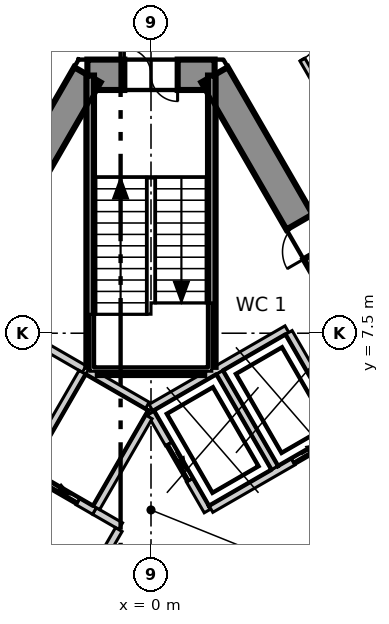
"""IFC4 building model, lengths in metres.
Left out: names, types, materials, properties, quantities, classifications, styles, units other than length and angle.
Written with IfcOpenShell. Run it as: python <this file> out.ifc"""

import sys

from ifc_helpers import new_model, si_unit, direction, frame, frame_2d, origin, place, context, subcontext, project, spatial, polyline, rectangle, outline, extrude, element, fill, save


model = new_model("IFC4")
c1 = context("Model", 3, precision=1e-05, world=origin(), true_north=direction((0.0, 1.0)))
c2 = subcontext(c1, "Body", "Model", "MODEL_VIEW")
j1 = project(units=[si_unit("LENGTHUNIT", "METRE"), si_unit("PLANEANGLEUNIT", "RADIAN")], contexts=[c1])
p1 = place(None, origin())
s1 = spatial("IfcSite", under=j1, at=p1, CompositionType="ELEMENT")
p2 = place(p1, origin())
s2 = spatial("IfcBuilding", under=s1, at=p2, CompositionType="ELEMENT")
p3 = place(p2, frame((0.0, 0.0, 140.3)))
s3 = spatial("IfcBuildingStorey", under=s2, at=p3, CompositionType="ELEMENT", Elevation=140.3)
p4 = place(p3, frame((1.674, 14.3, -0.3), z_axis=(0.0, 0.0, 1.0), x_axis=(-1.0, 0.0, 0.0)))
e1 = element("IfcWall", 1, at=p4, inside=s3, PredefinedType="SHEAR", context=c2, shape_type="SweptSolid", body=[
    extrude(outline(polyline([(-0.231, -0.4), (1.674, -0.4), (3.579, -0.4), (3.117, 0.4), (1.674, 0.4), (0.231, 0.4), (-0.231, -0.4)])), origin(), (0.0, 0.0, 1.0), 4.0),
])
p5 = place(p4, frame((0.974, 0.0, 0.3)))
e2 = element("IfcOpeningElement", 2, at=p5, cuts=e1, PredefinedType="OPENING", context=c2, shape_type="SweptSolid", body=[
    extrude(rectangle(XDim=1.4, YDim=2.1, at=frame_2d((0.7, 1.05))), frame((0.0, 0.41, 0.0), z_axis=(0.0, -1.0, 0.0), x_axis=(1.0, 0.0, 0.0)), (0.0, 0.0, 1.0), 0.82),
])
p6 = place(p3, frame((-1.674, 14.3, -0.3), z_axis=(0.0, 0.0, 1.0), x_axis=(-0.499995765644, -0.866027848477, 0.0)))
e3 = element("IfcWall", 3, at=p6, inside=s3, PredefinedType="SHEAR", context=c2, shape_type="SweptSolid", body=[
    extrude(outline(polyline([(-0.231, -0.4), (1.732, -0.4), (3.695, -0.4), (5.658, -0.4), (7.621, -0.4), (9.584, -0.4), (11.547, -0.4), (13.51, -0.4), (15.473, -0.4), (17.436, -0.4), (19.399, -0.4), (21.362, -0.4), (23.325, -0.4), (22.863, 0.4), (20.977, 0.4), (19.091, 0.4), (17.205, 0.4), (15.319, 0.4), (13.433, 0.4), (11.547, 0.4), (9.661, 0.4), (7.775, 0.4), (5.889, 0.4), (4.003, 0.4), (2.117, 0.4), (0.231, 0.4), (-0.231, -0.4)])), origin(), (0.0, 0.0, 1.0), 4.0),
])
p7 = place(p6, frame((10.997, 0.0, 0.3)))
e4 = element("IfcOpeningElement", 4, at=p7, cuts=e3, PredefinedType="OPENING", context=c2, shape_type="SweptSolid", body=[
    extrude(rectangle(XDim=1.1, YDim=2.1, at=frame_2d((0.55, 1.05))), frame((0.0, 0.41, 0.0), z_axis=(0.0, -1.0, 0.0), x_axis=(1.0, 0.0, 0.0)), (0.0, 0.0, 1.0), 0.82),
])
p8 = place(p6, frame((4.474, 0.0, 0.3)))
e5 = element("IfcOpeningElement", 5, at=p8, cuts=e3, PredefinedType="OPENING", context=c2, shape_type="SweptSolid", body=[
    extrude(rectangle(XDim=0.9, YDim=2.1, at=frame_2d((0.45, 1.05))), frame((0.0, 0.41, 0.0), z_axis=(0.0, -1.0, 0.0), x_axis=(1.0, 0.0, 0.0)), (0.0, 0.0, 1.0), 0.82),
])
p9 = place(p3, frame((13.221, -5.7, -0.3), z_axis=(0.0, 0.0, 1.0), x_axis=(-0.499995765644, 0.866027848477, 0.0)))
e6 = element("IfcWall", 6, at=p9, inside=s3, PredefinedType="SHEAR", context=c2, shape_type="SweptSolid", body=[
    extrude(outline(polyline([(-0.231, -0.4), (1.732, -0.4), (3.695, -0.4), (5.658, -0.4), (7.621, -0.4), (9.584, -0.4), (11.547, -0.4), (13.51, -0.4), (15.473, -0.4), (17.436, -0.4), (19.399, -0.4), (21.362, -0.4), (23.325, -0.4), (22.863, 0.4), (20.977, 0.4), (19.091, 0.4), (17.205, 0.4), (15.319, 0.4), (13.433, 0.4), (11.547, 0.4), (9.661, 0.4), (7.775, 0.4), (5.889, 0.4), (4.003, 0.4), (2.117, 0.4), (0.231, 0.4), (-0.231, -0.4)])), origin(), (0.0, 0.0, 1.0), 4.0),
])
p10 = place(p9, frame((10.647, 0.0, 0.3)))
e7 = element("IfcOpeningElement", 7, at=p10, cuts=e6, PredefinedType="OPENING", context=c2, shape_type="SweptSolid", body=[
    extrude(rectangle(XDim=1.8, YDim=2.1, at=frame_2d((0.9, 1.05))), frame((0.0, 0.41, 0.0), z_axis=(0.0, -1.0, 0.0), x_axis=(1.0, 0.0, 0.0)), (0.0, 0.0, 1.0), 0.82),
])
p11 = place(p9, frame((17.721, 0.0, 0.3)))
e8 = element("IfcOpeningElement", 8, at=p11, cuts=e6, PredefinedType="OPENING", context=c2, shape_type="SweptSolid", body=[
    extrude(rectangle(XDim=0.9, YDim=2.1, at=frame_2d((0.45, 1.05))), frame((0.0, 0.41, 0.0), z_axis=(0.0, -1.0, 0.0), x_axis=(1.0, 0.0, 0.0)), (0.0, 0.0, 1.0), 0.82),
])
p12 = place(p3, frame((31.126, -14.433, 0.0), z_axis=(0.0, 0.0, 1.0), x_axis=(-0.500008098571, 0.866020728022, 0.0)))
e9 = element("IfcWall", 9, at=p12, inside=s3, PredefinedType="ELEMENTEDWALL", context=c2, shape_type="SweptSolid", body=[
    extrude(rectangle(XDim=56.105, YDim=0.2, at=frame_2d((28.052, 0.0))), origin(), (0.0, 0.0, 1.0), 3.7),
])
p13 = place(p12, frame((2.198, 0.0, 0.9)))
e10 = element("IfcOpeningElement", 10, at=p13, cuts=e9, PredefinedType="OPENING", context=c2, shape_type="SweptSolid", body=[
    extrude(rectangle(XDim=4.9, YDim=2.5, at=frame_2d((2.45, 1.25))), frame((0.0, 0.11, 0.0), z_axis=(0.0, -1.0, 0.0), x_axis=(1.0, 0.0, 0.0)), (0.0, 0.0, 1.0), 0.22),
])
p14 = place(p12, frame((8.888, 0.0, 0.9)))
e11 = element("IfcOpeningElement", 11, at=p14, cuts=e9, PredefinedType="OPENING", context=c2, shape_type="SweptSolid", body=[
    extrude(rectangle(XDim=4.9, YDim=2.5, at=frame_2d((2.45, 1.25))), frame((0.0, 0.11, 0.0), z_axis=(0.0, -1.0, 0.0), x_axis=(1.0, 0.0, 0.0)), (0.0, 0.0, 1.0), 0.22),
])
p15 = place(p12, frame((15.578, 0.0, 0.9)))
e12 = element("IfcOpeningElement", 12, at=p15, cuts=e9, PredefinedType="OPENING", context=c2, shape_type="SweptSolid", body=[
    extrude(rectangle(XDim=4.9, YDim=2.5, at=frame_2d((2.45, 1.25))), frame((0.0, 0.11, 0.0), z_axis=(0.0, -1.0, 0.0), x_axis=(1.0, 0.0, 0.0)), (0.0, 0.0, 1.0), 0.22),
])
p16 = place(p12, frame((22.267, 0.0, 0.9)))
e13 = element("IfcOpeningElement", 13, at=p16, cuts=e9, PredefinedType="OPENING", context=c2, shape_type="SweptSolid", body=[
    extrude(rectangle(XDim=4.9, YDim=2.5, at=frame_2d((2.45, 1.25))), frame((0.0, 0.11, 0.0), z_axis=(0.0, -1.0, 0.0), x_axis=(1.0, 0.0, 0.0)), (0.0, 0.0, 1.0), 0.22),
])
p17 = place(p12, frame((28.957, 0.0, 0.9)))
e14 = element("IfcOpeningElement", 14, at=p17, cuts=e9, PredefinedType="OPENING", context=c2, shape_type="SweptSolid", body=[
    extrude(rectangle(XDim=4.9, YDim=2.5, at=frame_2d((2.45, 1.25))), frame((0.0, 0.11, 0.0), z_axis=(0.0, -1.0, 0.0), x_axis=(1.0, 0.0, 0.0)), (0.0, 0.0, 1.0), 0.22),
])
p18 = place(p12, frame((35.647, 0.0, 0.9)))
e15 = element("IfcOpeningElement", 15, at=p18, cuts=e9, PredefinedType="OPENING", context=c2, shape_type="SweptSolid", body=[
    extrude(rectangle(XDim=4.9, YDim=2.5, at=frame_2d((2.45, 1.25))), frame((0.0, 0.11, 0.0), z_axis=(0.0, -1.0, 0.0), x_axis=(1.0, 0.0, 0.0)), (0.0, 0.0, 1.0), 0.22),
])
p19 = place(p12, frame((42.337, 0.0, 0.9)))
e16 = element("IfcOpeningElement", 16, at=p19, cuts=e9, PredefinedType="OPENING", context=c2, shape_type="SweptSolid", body=[
    extrude(rectangle(XDim=4.9, YDim=2.5, at=frame_2d((2.45, 1.25))), frame((0.0, 0.11, 0.0), z_axis=(0.0, -1.0, 0.0), x_axis=(1.0, 0.0, 0.0)), (0.0, 0.0, 1.0), 0.22),
])
p20 = place(p12, frame((49.027, 0.0, 0.9)))
e17 = element("IfcOpeningElement", 17, at=p20, cuts=e9, PredefinedType="OPENING", context=c2, shape_type="SweptSolid", body=[
    extrude(rectangle(XDim=4.9, YDim=2.5, at=frame_2d((2.45, 1.25))), frame((0.0, 0.11, 0.0), z_axis=(0.0, -1.0, 0.0), x_axis=(1.0, 0.0, 0.0)), (0.0, 0.0, 1.0), 0.22),
])
p21 = place(p3, frame((-8.902, 6.181, 0.0), z_axis=(0.0, 0.0, 1.0), x_axis=(0.499992688384, 0.866029625107, 0.0)))
e18 = element("IfcWall", 18, at=p21, inside=s3, PredefinedType="PARTITIONING", context=c2, shape_type="SweptSolid", body=[
    extrude(rectangle(XDim=17.804, YDim=0.15, at=frame_2d((8.902, 0.0))), origin(), (0.0, 0.0, 1.0), 3.7),
])
p22 = place(p21, frame((14.554, 0.0, 0.0)))
e19 = element("IfcOpeningElement", 19, at=p22, cuts=e18, PredefinedType="OPENING", context=c2, shape_type="SweptSolid", body=[
    extrude(rectangle(XDim=1.1, YDim=2.1, at=frame_2d((0.55, 1.05))), frame((0.0, 0.085, 0.0), z_axis=(0.0, -1.0, 0.0), x_axis=(1.0, 0.0, 0.0)), (0.0, 0.0, 1.0), 0.17),
])
p23 = place(p21, frame((10.428, 0.0, 0.0)))
e20 = element("IfcOpeningElement", 20, at=p23, cuts=e18, PredefinedType="OPENING", context=c2, shape_type="SweptSolid", body=[
    extrude(rectangle(XDim=0.9, YDim=2.1, at=frame_2d((0.45, 1.05))), frame((0.0, 0.085, 0.0), z_axis=(0.0, -1.0, 0.0), x_axis=(1.0, 0.0, 0.0)), (0.0, 0.0, 1.0), 0.17),
])
p24 = place(p21, frame((7.228, 0.0, 0.0)))
e21 = element("IfcOpeningElement", 21, at=p24, cuts=e18, PredefinedType="OPENING", context=c2, shape_type="SweptSolid", body=[
    extrude(rectangle(XDim=0.9, YDim=2.1, at=frame_2d((0.45, 1.05))), frame((0.0, 0.085, 0.0), z_axis=(0.0, -1.0, 0.0), x_axis=(1.0, 0.0, 0.0)), (0.0, 0.0, 1.0), 0.17),
])
p25 = place(p21, frame((4.428, 0.0, 0.0)))
e22 = element("IfcOpeningElement", 22, at=p25, cuts=e18, PredefinedType="OPENING", context=c2, shape_type="SweptSolid", body=[
    extrude(rectangle(XDim=1.0, YDim=2.1, at=frame_2d((0.5, 1.05))), frame((0.0, 0.085, 0.0), z_axis=(0.0, -1.0, 0.0), x_axis=(1.0, 0.0, 0.0)), (0.0, 0.0, 1.0), 0.17),
])
p26 = place(p3, frame((0.076, 21.468, 0.0), z_axis=(0.0, 0.0, 1.0), x_axis=(0.499999691263, -0.866025582034, 0.0)))
e23 = element("IfcWall", 23, at=p26, inside=s3, PredefinedType="PARTITIONING", context=c2, shape_type="SweptSolid", body=[
    extrude(rectangle(XDim=24.342, YDim=0.15, at=frame_2d((12.171, 0.0))), origin(), (0.0, 0.0, 1.0), 3.7),
])
p27 = place(p26, frame((17.594, 0.0, 0.0)))
e24 = element("IfcOpeningElement", 24, at=p27, cuts=e23, PredefinedType="OPENING", context=c2, shape_type="SweptSolid", body=[
    extrude(rectangle(XDim=1.1, YDim=2.1, at=frame_2d((0.55, 1.05))), frame((0.0, 0.085, 0.0), z_axis=(0.0, -1.0, 0.0), x_axis=(1.0, 0.0, 0.0)), (0.0, 0.0, 1.0), 0.17),
])
p28 = place(p26, frame((6.814, 0.0, 0.0)))
e25 = element("IfcOpeningElement", 25, at=p28, cuts=e23, PredefinedType="OPENING", context=c2, shape_type="SweptSolid", body=[
    extrude(rectangle(XDim=1.0, YDim=2.1, at=frame_2d((0.5, 1.05))), frame((0.0, 0.085, 0.0), z_axis=(0.0, -1.0, 0.0), x_axis=(1.0, 0.0, 0.0)), (0.0, 0.0, 1.0), 0.17),
])
p29 = place(p26, frame((10.214, 0.0, 0.0)))
e26 = element("IfcOpeningElement", 26, at=p29, cuts=e23, PredefinedType="OPENING", context=c2, shape_type="SweptSolid", body=[
    extrude(rectangle(XDim=0.9, YDim=2.1, at=frame_2d((0.45, 1.05))), frame((0.0, 0.085, 0.0), z_axis=(0.0, -1.0, 0.0), x_axis=(1.0, 0.0, 0.0)), (0.0, 0.0, 1.0), 0.17),
])
p30 = place(p26, frame((1.924, 0.0, 0.0)))
e27 = element("IfcOpeningElement", 27, at=p30, cuts=e23, PredefinedType="OPENING", context=c2, shape_type="SweptSolid", body=[
    extrude(rectangle(XDim=1.1, YDim=2.1, at=frame_2d((0.55, 1.05))), frame((0.0, 0.085, 0.0), z_axis=(0.0, -1.0, 0.0), x_axis=(1.0, 0.0, 0.0)), (0.0, 0.0, 1.0), 0.17),
])
p31 = place(p3, frame((-0.002, 5.542, 0.0), z_axis=(0.0, 0.0, 1.0), x_axis=(0.866103910842, 0.499863997127, 0.0)))
e28 = element("IfcWall", 28, at=p31, inside=s3, PredefinedType="SOLIDWALL", context=c2, shape_type="SweptSolid", body=[
    extrude(rectangle(XDim=4.131, YDim=0.2, at=frame_2d((2.065, 0.0))), origin(), (0.0, 0.0, 1.0), 3.7),
])
p32 = place(p3, frame((0.0, 5.4, 0.0), z_axis=(0.0, 0.0, 1.0), x_axis=(0.500103862429, -0.865965430478, 0.0)))
e29 = element("IfcWall", 29, at=p32, inside=s3, PredefinedType="SOLIDWALL", context=c2, shape_type="SweptSolid", body=[
    extrude(rectangle(XDim=2.973, YDim=0.2, at=frame_2d((1.487, 0.0))), origin(), (0.0, 0.0, 1.0), 3.7),
])
p33 = place(p32, frame((0.937, 0.0, 0.0)))
e30 = element("IfcOpeningElement", 30, at=p33, cuts=e29, PredefinedType="OPENING", context=c2, shape_type="SweptSolid", body=[
    extrude(rectangle(XDim=1.1, YDim=2.1, at=frame_2d((0.55, 1.05))), frame((0.0, 0.11, 0.0), z_axis=(0.0, -1.0, 0.0), x_axis=(1.0, 0.0, 0.0)), (0.0, 0.0, 1.0), 0.22),
])
p34 = place(p3, frame((1.577, 2.874, 0.0), z_axis=(0.0, 0.0, 1.0), x_axis=(0.866073694534, 0.499916348638, 0.0)))
e31 = element("IfcWall", 31, at=p34, inside=s3, PredefinedType="SOLIDWALL", context=c2, shape_type="SweptSolid", body=[
    extrude(rectangle(XDim=5.777, YDim=0.2, at=frame_2d((2.888, 0.0))), origin(), (0.0, 0.0, 1.0), 3.7),
])
p35 = place(p34, frame((2.497, 0.0, 0.0)))
e32 = element("IfcOpeningElement", 32, at=p35, cuts=e31, PredefinedType="OPENING", context=c2, shape_type="SweptSolid", body=[
    extrude(rectangle(XDim=1.1, YDim=2.1, at=frame_2d((0.55, 1.05))), frame((0.0, 0.11, 0.0), z_axis=(0.0, -1.0, 0.0), x_axis=(1.0, 0.0, 0.0)), (0.0, 0.0, 1.0), 0.22),
])
p36 = place(p3, frame((3.278, -0.071, 0.0), z_axis=(0.0, 0.0, 1.0), x_axis=(0.865929348003, 0.5001663366, 0.0)))
e33 = element("IfcWall", 33, at=p36, inside=s3, PredefinedType="SOLIDWALL", context=c2, shape_type="SweptSolid", body=[
    extrude(rectangle(XDim=5.776, YDim=0.2, at=frame_2d((2.888, 0.0))), origin(), (0.0, 0.0, 1.0), 3.7),
])
for number, where, z_axis, x_axis in (
    (34, (3.626, 7.52, 0.0), (0.0, 0.0, 1.0), (0.5, -0.866, 0.0)),
    (35, (1.807, 6.47, 0.0), (0.0, 0.0, 1.0), (0.5, -0.866, 0.0)),
):
    element("IfcWall", number, at=place(p3, frame(where, z_axis=z_axis, x_axis=x_axis)), inside=s3, PredefinedType="SOLIDWALL", context=c2, shape_type="SweptSolid", body=[
        extrude(rectangle(XDim=2.9, YDim=0.2, at=frame_2d((1.45, 0.0))), origin(), (0.0, 0.0, 1.0), 3.7),
    ])
p37 = place(p3, frame((-1.488, 2.822, 0.0), z_axis=(0.0, 0.0, 1.0), x_axis=(0.866236612152, -0.499633997809, 0.0)))
e36 = element("IfcWall", 36, at=p37, inside=s3, PredefinedType="SOLIDWALL", context=c2, shape_type="SweptSolid", body=[
    extrude(rectangle(XDim=0.796, YDim=0.2, at=frame_2d((0.398, 0.0))), origin(), (0.0, 0.0, 1.0), 3.7),
])
p38 = place(p3, frame((-3.489, 7.557, 0.0), z_axis=(0.0, 0.0, 1.0), x_axis=(0.866010750942, -0.50002537861, 0.0)))
e37 = element("IfcWall", 37, at=p38, inside=s3, PredefinedType="SOLIDWALL", context=c2, shape_type="SweptSolid", body=[
    extrude(rectangle(XDim=2.0, YDim=0.2, at=frame_2d((1.0, 0.0))), origin(), (0.0, 0.0, 1.0), 3.7),
])
p39 = place(p3, frame((-2.444, -0.433, 0.0), z_axis=(0.0, 0.0, 1.0), x_axis=(0.500035624827, 0.866004834804, 0.0)))
e38 = element("IfcWall", 38, at=p39, inside=s3, PredefinedType="SOLIDWALL", context=c2, shape_type="SweptSolid", body=[
    extrude(rectangle(XDim=3.194, YDim=0.2, at=frame_2d((1.597, 0.0))), origin(), (0.0, 0.0, 1.0), 3.7),
])
p40 = place(p3, frame((-3.309, 3.873, 0.0), z_axis=(0.0, 0.0, 1.0), x_axis=(0.866098583652, -0.499873227325, 0.0)))
e39 = element("IfcWall", 39, at=p40, inside=s3, PredefinedType="SOLIDWALL", context=c2, shape_type="SweptSolid", body=[
    extrude(rectangle(XDim=2.103, YDim=0.2, at=frame_2d((1.051, 0.0))), origin(), (0.0, 0.0, 1.0), 3.7),
])
p41 = place(p40, frame((0.502, 0.0, 0.0)))
e40 = element("IfcOpeningElement", 40, at=p41, cuts=e39, PredefinedType="OPENING", context=c2, shape_type="SweptSolid", body=[
    extrude(rectangle(XDim=1.1, YDim=2.1, at=frame_2d((0.55, 1.05))), frame((0.0, 0.11, 0.0), z_axis=(0.0, -1.0, 0.0), x_axis=(1.0, 0.0, 0.0)), (0.0, 0.0, 1.0), 0.22),
])
p42 = place(p3, frame((-3.257, 3.959, 0.0), z_axis=(0.0, 0.0, 1.0), x_axis=(0.50012328804, 0.865954211699, 0.0)))
e41 = element("IfcWall", 41, at=p42, inside=s3, PredefinedType="SOLIDWALL", context=c2, shape_type="SweptSolid", body=[
    extrude(rectangle(XDim=2.9, YDim=0.2, at=frame_2d((1.45, 0.0))), origin(), (0.0, 0.0, 1.0), 3.7),
])
p43 = place(p3, frame((-1.67, 6.507, 0.0), z_axis=(0.0, 0.0, 1.0), x_axis=(0.865941441609, -0.500145398563, 0.0)))
e42 = element("IfcWall", 42, at=p43, inside=s3, PredefinedType="SOLIDWALL", context=c2, shape_type="SweptSolid", body=[
    extrude(rectangle(XDim=1.815, YDim=0.2, at=frame_2d((0.908, 0.0))), origin(), (0.0, 0.0, 1.0), 3.7),
])
p44 = place(p3, frame((-1.438, 2.909, 0.0), z_axis=(0.0, 0.0, 1.0), x_axis=(0.499829630636, 0.866123744241, 0.0)))
e43 = element("IfcWall", 43, at=p44, inside=s3, PredefinedType="SOLIDWALL", context=c2, shape_type="SweptSolid", body=[
    extrude(rectangle(XDim=2.761, YDim=0.2, at=frame_2d((1.38, 0.0))), origin(), (0.0, 0.0, 1.0), 3.7),
])
p45 = place(p3, frame((1.6, 6.615, 0.0), z_axis=(0.0, 0.0, 1.0), x_axis=(0.0, 1.0, 0.0)))
e44 = element("IfcWall", 44, at=p45, inside=s3, PredefinedType="SOLIDWALL", context=c2, shape_type="SweptSolid", body=[
    extrude(rectangle(XDim=7.665, YDim=0.2, at=frame_2d((3.833, 0.0))), origin(), (0.0, 0.0, 1.0), 3.7),
])
p46 = place(p3, frame((-1.4, 6.5, 0.0), z_axis=(0.0, 0.0, 1.0), x_axis=(1.0, 0.0, 0.0)))
e45 = element("IfcWall", 45, at=p46, inside=s3, PredefinedType="SOLIDWALL", context=c2, shape_type="SweptSolid", body=[
    extrude(rectangle(XDim=2.8, YDim=0.2, at=frame_2d((1.4, 0.0))), origin(), (0.0, 0.0, 1.0), 3.7),
])
p47 = place(p3, frame((-1.6, 6.615, 0.0), z_axis=(0.0, 0.0, 1.0), x_axis=(0.0, 1.0, 0.0)))
e46 = element("IfcWall", 46, at=p47, inside=s3, PredefinedType="SOLIDWALL", context=c2, shape_type="SweptSolid", body=[
    extrude(rectangle(XDim=7.665, YDim=0.2, at=frame_2d((3.833, 0.0))), origin(), (0.0, 0.0, 1.0), 3.7),
])
p48 = place(p33, origin())
e47 = element("IfcDoor", 47, at=p48, inside=s3, OperationType="SLIDING_TO_LEFT", PredefinedType="DOOR", context=c2, shape_type="SweptSolid", body=[
    extrude(rectangle(XDim=1.1, YDim=2.1, at=frame_2d((0.55, 1.05))), frame((0.0, 0.025, 0.0), z_axis=(0.0, -1.0, 0.0), x_axis=(1.0, 0.0, 0.0)), (0.0, 0.0, 1.0), 0.05),
])
fill(e30, e47)
p49 = place(p35, origin())
e48 = element("IfcDoor", 48, at=p49, inside=s3, OperationType="SLIDING_TO_LEFT", PredefinedType="DOOR", context=c2, shape_type="SweptSolid", body=[
    extrude(rectangle(XDim=1.1, YDim=2.1, at=frame_2d((0.55, 1.05))), frame((0.0, 0.025, 0.0), z_axis=(0.0, -1.0, 0.0), x_axis=(1.0, 0.0, 0.0)), (0.0, 0.0, 1.0), 0.05),
])
fill(e32, e48)
p50 = place(p41, origin())
e49 = element("IfcDoor", 49, at=p50, inside=s3, OperationType="SLIDING_TO_LEFT", PredefinedType="DOOR", context=c2, shape_type="SweptSolid", body=[
    extrude(rectangle(XDim=1.1, YDim=2.1, at=frame_2d((0.55, 1.05))), frame((0.0, 0.025, 0.0), z_axis=(0.0, -1.0, 0.0), x_axis=(1.0, 0.0, 0.0)), (0.0, 0.0, 1.0), 0.05),
])
fill(e40, e49)
p51 = place(p28, origin())
e50 = element("IfcDoor", 50, at=p51, inside=s3, OperationType="SINGLE_SWING_RIGHT", PredefinedType="DOOR", context=c2, shape_type="SweptSolid", body=[
    extrude(rectangle(XDim=1.0, YDim=2.1, at=frame_2d((0.5, 1.05))), frame((0.0, 0.025, 0.0), z_axis=(0.0, -1.0, 0.0), x_axis=(1.0, 0.0, 0.0)), (0.0, 0.0, 1.0), 0.05),
])
fill(e25, e50)
p52 = place(p5, origin())
e51 = element("IfcDoor", 51, at=p52, inside=s3, OperationType="DOUBLE_DOOR_SINGLE_SWING", PredefinedType="DOOR", context=c2, shape_type="SweptSolid", body=[
    extrude(rectangle(XDim=1.4, YDim=2.1, at=frame_2d((0.7, 1.05))), frame((0.0, 0.025, 0.0), z_axis=(0.0, -1.0, 0.0), x_axis=(1.0, 0.0, 0.0)), (0.0, 0.0, 1.0), 0.05),
])
fill(e2, e51)
p53 = place(p11, origin())
e52 = element("IfcDoor", 52, at=p53, inside=s3, OperationType="SINGLE_SWING_RIGHT", PredefinedType="DOOR", context=c2, shape_type="SweptSolid", body=[
    extrude(rectangle(XDim=0.9, YDim=2.1, at=frame_2d((0.45, 1.05))), frame((0.0, 0.025, 0.0), z_axis=(0.0, -1.0, 0.0), x_axis=(1.0, 0.0, 0.0)), (0.0, 0.0, 1.0), 0.05),
])
fill(e8, e52)
save(model, sys.argv[1])
